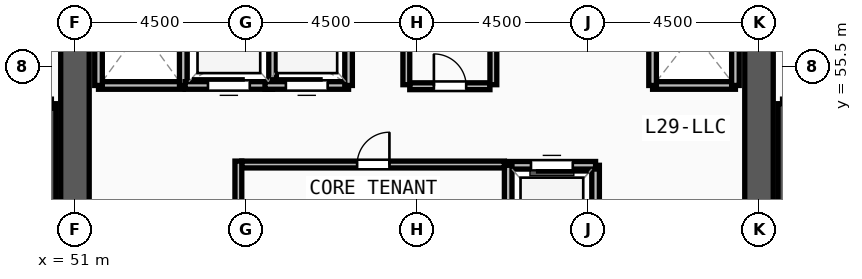
"""IFC4 building model, lengths in metres.
Left out: names, types, materials, properties, quantities, classifications, styles, units other than length and angle.
Written with IfcOpenShell. Run it as: python <this file> out.ifc"""

import sys

from ifc_helpers import new_model, si_unit, direction, frame, frame_2d, origin, place, context, subcontext, project, spatial, rectangle, extrude, source, transform, mapped, element, fill, save


model = new_model("IFC4")
c1 = context("Model", 3, precision=1e-05, world=origin(), true_north=direction((0.0, 1.0)))
c2 = subcontext(c1, "Body", "Model", "MODEL_VIEW")
j1 = project(units=[si_unit("LENGTHUNIT", "METRE"), si_unit("PLANEANGLEUNIT", "RADIAN")], contexts=[c1])
p1 = place(None, origin())
s1 = spatial("IfcSite", under=j1, at=p1, CompositionType="ELEMENT")
p2 = place(p1, origin())
s2 = spatial("IfcBuilding", under=s1, at=p2, CompositionType="ELEMENT")
p3 = place(p2, frame((0.0, 0.0, 113.25)))
s3 = spatial("IfcBuildingStorey", under=s2, at=p3, CompositionType="ELEMENT", Elevation=113.25)
p4 = place(p3, frame((69.0, 60.75, 0.0), z_axis=(0.0, 0.0, 1.0), x_axis=(0.0, -1.0, 0.0)))
e1 = element("IfcWall", 1, at=p4, inside=s3, PredefinedType="SHEAR", context=c2, shape_type="SweptSolid", body=[
    extrude(rectangle(XDim=13.5, YDim=0.75, at=frame_2d((6.75, 0.0))), origin(), (0.0, 0.0, 1.0), 3.57),
])
m1 = source(origin(), c2, "Body", "SweptSolid", [
    extrude(rectangle(XDim=1.2, YDim=2.2, at=frame_2d((0.6, 1.1))), frame((0.0, 0.385, 0.0), z_axis=(0.0, -1.0, 0.0), x_axis=(1.0, 0.0, 0.0)), (0.0, 0.0, 1.0), 0.77),
])
p5 = place(p4, frame((1.2, 0.0, 0.0)))
e2 = element("IfcOpeningElement", 2, at=p5, cuts=e1, PredefinedType="OPENING", context=c2, shape_type="MappedRepresentation", body=[
    mapped(m1, transform((0.0, 0.0, 0.0), x_axis=(1.0, 0.0, 0.0), y_axis=(0.0, 1.0, 0.0), z_axis=(0.0, 0.0, 1.0), scale=1.0)),
])
p6 = place(p3, frame((51.0, 47.25, 0.0), z_axis=(0.0, 0.0, 1.0), x_axis=(0.0, 1.0, 0.0)))
e3 = element("IfcWall", 3, at=p6, inside=s3, PredefinedType="SHEAR", context=c2, shape_type="SweptSolid", body=[
    extrude(rectangle(XDim=13.5, YDim=0.75, at=frame_2d((6.75, 0.0))), origin(), (0.0, 0.0, 1.0), 3.57),
])
for number, where, z_axis, x_axis in (
    (4, (50.38, 46.7, 0.0), (0.0, 0.0, 1.0), (0.0, 1.0, 0.0)),
    (5, (69.62, 54.52, 0.0), (0.0, 0.0, 1.0), (0.0, -1.0, 0.0)),
):
    element("IfcWall", number, at=place(p3, frame(where, z_axis=z_axis, x_axis=x_axis)), inside=s3, PredefinedType="SOLIDWALL", context=c2, shape_type="SweptSolid", body=[
        extrude(rectangle(XDim=7.82, YDim=0.24, at=frame_2d((3.91, 0.0))), origin(), (0.0, 0.0, 1.0), 3.57),
    ])
p7 = place(p3, frame((51.62, 55.0, 0.0), z_axis=(0.0, 0.0, 1.0), x_axis=(1.0, 0.0, 0.0)))
e6 = element("IfcWall", 6, at=p7, inside=s3, PredefinedType="SOLIDWALL", context=c2, shape_type="SweptSolid", body=[
    extrude(rectangle(XDim=2.23, YDim=0.2, at=frame_2d((1.115, 0.0))), origin(), (0.0, 0.0, 1.0), 3.57),
])
for number, where, z_axis, x_axis in (
    (7, (53.85, 55.0, 0.0), (0.0, 0.0, 1.0), (0.0, 1.0, 0.0)),
    (8, (51.62, 58.0, 0.0), (0.0, 0.0, 1.0), (0.0, -1.0, 0.0)),
):
    element("IfcWall", number, at=place(p3, frame(where, z_axis=z_axis, x_axis=x_axis)), inside=s3, PredefinedType="SOLIDWALL", context=c2, shape_type="SweptSolid", body=[
        extrude(rectangle(XDim=3.0, YDim=0.2, at=frame_2d((1.5, 0.0))), origin(), (0.0, 0.0, 1.0), 3.57),
    ])
p8 = place(p3, frame((66.2, 55.0, 0.0), z_axis=(0.0, 0.0, 1.0), x_axis=(1.0, 0.0, 0.0)))
e9 = element("IfcWall", 9, at=p8, inside=s3, PredefinedType="SOLIDWALL", context=c2, shape_type="SweptSolid", body=[
    extrude(rectangle(XDim=2.18, YDim=0.2, at=frame_2d((1.09, 0.0))), origin(), (0.0, 0.0, 1.0), 3.57),
])
for number, where, z_axis, x_axis in (
    (10, (68.38, 55.0, 0.0), (0.0, 0.0, 1.0), (0.0, 1.0, 0.0)),
    (11, (66.2, 57.75, 0.0), (0.0, 0.0, 1.0), (0.0, -1.0, 0.0)),
):
    element("IfcWall", number, at=place(p3, frame(where, z_axis=z_axis, x_axis=x_axis)), inside=s3, PredefinedType="SOLIDWALL", context=c2, shape_type="SweptSolid", body=[
        extrude(rectangle(XDim=2.75, YDim=0.2, at=frame_2d((1.375, 0.0))), origin(), (0.0, 0.0, 1.0), 3.57),
    ])
p9 = place(p3, frame((64.7, 50.3, 0.0), z_axis=(0.0, 0.0, 1.0), x_axis=(0.0, 1.0, 0.0)))
e12 = element("IfcWall", 12, at=p9, inside=s3, PredefinedType="SOLIDWALL", context=c2, shape_type="SweptSolid", body=[
    extrude(rectangle(XDim=2.6, YDim=0.2, at=frame_2d((1.3, 0.0))), origin(), (0.0, 0.0, 1.0), 3.57),
])
p10 = place(p3, frame((64.7, 52.9, 0.0), z_axis=(0.0, 0.0, 1.0), x_axis=(-1.0, 0.0, 0.0)))
e13 = element("IfcWall", 13, at=p10, inside=s3, PredefinedType="SOLIDWALL", context=c2, shape_type="SweptSolid", body=[
    extrude(rectangle(XDim=2.3, YDim=0.2, at=frame_2d((1.15, 0.0))), origin(), (0.0, 0.0, 1.0), 3.57),
])
m2 = source(origin(), c2, "Body", "SweptSolid", [
    extrude(rectangle(XDim=1.1, YDim=2.2, at=frame_2d((0.55, 1.1))), frame((0.0, 0.11, 0.0), z_axis=(0.0, -1.0, 0.0), x_axis=(1.0, 0.0, 0.0)), (0.0, 0.0, 1.0), 0.22),
])
p11 = place(p10, frame((0.6, 0.0, 0.0)))
e14 = element("IfcOpeningElement", 14, at=p11, cuts=e13, PredefinedType="OPENING", context=c2, shape_type="MappedRepresentation", body=[
    mapped(m2, transform((0.0, 0.0, 0.0), x_axis=(1.0, 0.0, 0.0), y_axis=(0.0, 1.0, 0.0), z_axis=(0.0, 0.0, 1.0), scale=1.0)),
])
p12 = place(p3, frame((62.4, 52.9, 0.0), z_axis=(0.0, 0.0, 1.0), x_axis=(0.0, -1.0, 0.0)))
e15 = element("IfcWall", 15, at=p12, inside=s3, PredefinedType="SOLIDWALL", context=c2, shape_type="SweptSolid", body=[
    extrude(rectangle(XDim=2.6, YDim=0.2, at=frame_2d((1.3, 0.0))), origin(), (0.0, 0.0, 1.0), 3.57),
])
p13 = place(p3, frame((53.9, 55.0, 0.0), z_axis=(0.0, 0.0, 1.0), x_axis=(1.0, 0.0, 0.0)))
e16 = element("IfcWall", 16, at=p13, inside=s3, PredefinedType="SOLIDWALL", context=c2, shape_type="SweptSolid", body=[
    extrude(rectangle(XDim=2.3, YDim=0.2, at=frame_2d((1.15, 0.0))), origin(), (0.0, 0.0, 1.0), 3.57),
])
p14 = place(p13, frame((0.6, 0.0, 0.0)))
e17 = element("IfcOpeningElement", 17, at=p14, cuts=e16, PredefinedType="OPENING", context=c2, shape_type="MappedRepresentation", body=[
    mapped(m2, transform((0.0, 0.0, 0.0), x_axis=(1.0, 0.0, 0.0), y_axis=(0.0, 1.0, 0.0), z_axis=(0.0, 0.0, 1.0), scale=1.0)),
])
p15 = place(p3, frame((56.2, 55.0, 0.0), z_axis=(0.0, 0.0, 1.0), x_axis=(0.0, 1.0, 0.0)))
e18 = element("IfcWall", 18, at=p15, inside=s3, PredefinedType="SOLIDWALL", context=c2, shape_type="SweptSolid", body=[
    extrude(rectangle(XDim=2.6, YDim=0.2, at=frame_2d((1.3, 0.0))), origin(), (0.0, 0.0, 1.0), 3.57),
])
p16 = place(p3, frame((56.0, 55.0, 0.0), z_axis=(0.0, 0.0, 1.0), x_axis=(1.0, 0.0, 0.0)))
e19 = element("IfcWall", 19, at=p16, inside=s3, PredefinedType="SOLIDWALL", context=c2, shape_type="SweptSolid", body=[
    extrude(rectangle(XDim=2.2, YDim=0.2, at=frame_2d((1.1, 0.0))), origin(), (0.0, 0.0, 1.0), 3.57),
])
p17 = place(p16, frame((0.55, 0.0, 0.0)))
e20 = element("IfcOpeningElement", 20, at=p17, cuts=e19, PredefinedType="OPENING", context=c2, shape_type="MappedRepresentation", body=[
    mapped(m2, transform((0.0, 0.0, 0.0), x_axis=(1.0, 0.0, 0.0), y_axis=(0.0, 1.0, 0.0), z_axis=(0.0, 0.0, 1.0), scale=1.0)),
])
p18 = place(p3, frame((58.2, 55.0, 0.0), z_axis=(0.0, 0.0, 1.0), x_axis=(0.0, 1.0, 0.0)))
e21 = element("IfcWall", 21, at=p18, inside=s3, PredefinedType="SOLIDWALL", context=c2, shape_type="SweptSolid", body=[
    extrude(rectangle(XDim=2.6, YDim=0.2, at=frame_2d((1.3, 0.0))), origin(), (0.0, 0.0, 1.0), 3.57),
])
p19 = place(p3, frame((55.39, 52.92, 0.0), z_axis=(0.0, 0.0, 1.0), x_axis=(1.0, 0.0, 0.0)))
e22 = element("IfcWall", 22, at=p19, inside=s3, PredefinedType="PARTITIONING", context=c2, shape_type="SweptSolid", body=[
    extrude(rectangle(XDim=6.91, YDim=0.18, at=frame_2d((3.455, 0.0))), origin(), (0.0, 0.0, 1.0), 3.57),
])
m3 = source(origin(), c2, "Body", "SweptSolid", [
    extrude(rectangle(XDim=0.85, YDim=2.1, at=frame_2d((0.425, 1.05))), frame((0.0, 0.1, 0.0), z_axis=(0.0, -1.0, 0.0), x_axis=(1.0, 0.0, 0.0)), (0.0, 0.0, 1.0), 0.2),
])
p20 = place(p19, frame((3.035, 0.0, 0.0)))
e23 = element("IfcOpeningElement", 23, at=p20, cuts=e22, PredefinedType="OPENING", context=c2, shape_type="MappedRepresentation", body=[
    mapped(m3, transform((0.0, 0.0, 0.0), x_axis=(1.0, 0.0, 0.0), y_axis=(0.0, 1.0, 0.0), z_axis=(0.0, 0.0, 1.0), scale=1.0)),
])
p21 = place(p3, frame((59.81, 54.98, 0.0), z_axis=(0.0, 0.0, 1.0), x_axis=(1.0, 0.0, 0.0)))
e24 = element("IfcWall", 24, at=p21, inside=s3, PredefinedType="PARTITIONING", context=c2, shape_type="SweptSolid", body=[
    extrude(rectangle(XDim=2.11, YDim=0.18, at=frame_2d((1.055, 0.0))), origin(), (0.0, 0.0, 1.0), 3.57),
])
p22 = place(p21, frame((0.635, 0.0, 0.0)))
e25 = element("IfcOpeningElement", 25, at=p22, cuts=e24, PredefinedType="OPENING", context=c2, shape_type="MappedRepresentation", body=[
    mapped(m3, transform((0.0, 0.0, 0.0), x_axis=(1.0, 0.0, 0.0), y_axis=(0.0, 1.0, 0.0), z_axis=(0.0, 0.0, 1.0), scale=1.0)),
])
for number, where, z_axis, x_axis in (
    (26, (59.72, 55.02, 0.0), (0.0, 0.0, 1.0), (0.0, 1.0, 0.0)),
    (27, (62.01, 55.02, 0.0), (0.0, 0.0, 1.0), (0.0, 1.0, 0.0)),
):
    element("IfcWall", number, at=place(p3, frame(where, z_axis=z_axis, x_axis=x_axis)), inside=s3, PredefinedType="PARTITIONING", context=c2, shape_type="SweptSolid", body=[
        extrude(rectangle(XDim=2.88, YDim=0.18, at=frame_2d((1.44, 0.0))), origin(), (0.0, 0.0, 1.0), 3.57),
    ])
p23 = place(p3, frame((55.3, 50.22, 0.0), z_axis=(0.0, 0.0, 1.0), x_axis=(0.0, 1.0, 0.0)))
e28 = element("IfcWall", 28, at=p23, inside=s3, PredefinedType="PARTITIONING", context=c2, shape_type="SweptSolid", body=[
    extrude(rectangle(XDim=2.79, YDim=0.18, at=frame_2d((1.395, 0.0))), origin(), (0.0, 0.0, 1.0), 3.57),
])
m4 = source(origin(), c2, "Body", "SweptSolid", [
    extrude(rectangle(XDim=1.1, YDim=2.2, at=frame_2d((0.55, 1.1))), frame((0.0, 0.025, 0.0), z_axis=(0.0, -1.0, 0.0), x_axis=(1.0, 0.0, 0.0)), (0.0, 0.0, 1.0), 0.05),
])
p24 = place(p11, origin())
e29 = element("IfcDoor", 29, at=p24, inside=s3, OperationType="SLIDING_TO_LEFT", PredefinedType="DOOR", context=c2, shape_type="MappedRepresentation", body=[
    mapped(m4, transform((0.0, 0.0, 0.0), x_axis=(1.0, 0.0, 0.0), y_axis=(0.0, 1.0, 0.0), z_axis=(0.0, 0.0, 1.0), scale=1.0)),
])
fill(e14, e29)
p25 = place(p14, origin())
e30 = element("IfcDoor", 30, at=p25, inside=s3, OperationType="SLIDING_TO_LEFT", PredefinedType="DOOR", context=c2, shape_type="MappedRepresentation", body=[
    mapped(m4, transform((0.0, 0.0, 0.0), x_axis=(1.0, 0.0, 0.0), y_axis=(0.0, 1.0, 0.0), z_axis=(0.0, 0.0, 1.0), scale=1.0)),
])
fill(e17, e30)
p26 = place(p17, origin())
e31 = element("IfcDoor", 31, at=p26, inside=s3, OperationType="SLIDING_TO_LEFT", PredefinedType="DOOR", context=c2, shape_type="MappedRepresentation", body=[
    mapped(m4, transform((0.0, 0.0, 0.0), x_axis=(1.0, 0.0, 0.0), y_axis=(0.0, 1.0, 0.0), z_axis=(0.0, 0.0, 1.0), scale=1.0)),
])
fill(e20, e31)
m5 = source(origin(), c2, "Body", "SweptSolid", [
    extrude(rectangle(XDim=0.85, YDim=2.1, at=frame_2d((0.425, 1.05))), frame((0.0, 0.025, 0.0), z_axis=(0.0, -1.0, 0.0), x_axis=(1.0, 0.0, 0.0)), (0.0, 0.0, 1.0), 0.05),
])
p27 = place(p20, origin())
e32 = element("IfcDoor", 32, at=p27, inside=s3, OperationType="SINGLE_SWING_RIGHT", PredefinedType="DOOR", context=c2, shape_type="MappedRepresentation", body=[
    mapped(m5, transform((0.0, 0.0, 0.0), x_axis=(1.0, 0.0, 0.0), y_axis=(0.0, 1.0, 0.0), z_axis=(0.0, 0.0, 1.0), scale=1.0)),
])
fill(e23, e32)
p28 = place(p22, origin())
e33 = element("IfcDoor", 33, at=p28, inside=s3, OperationType="SINGLE_SWING_LEFT", PredefinedType="DOOR", context=c2, shape_type="MappedRepresentation", body=[
    mapped(m5, transform((0.0, 0.0, 0.0), x_axis=(1.0, 0.0, 0.0), y_axis=(0.0, 1.0, 0.0), z_axis=(0.0, 0.0, 1.0), scale=1.0)),
])
fill(e25, e33)
save(model, sys.argv[1])
